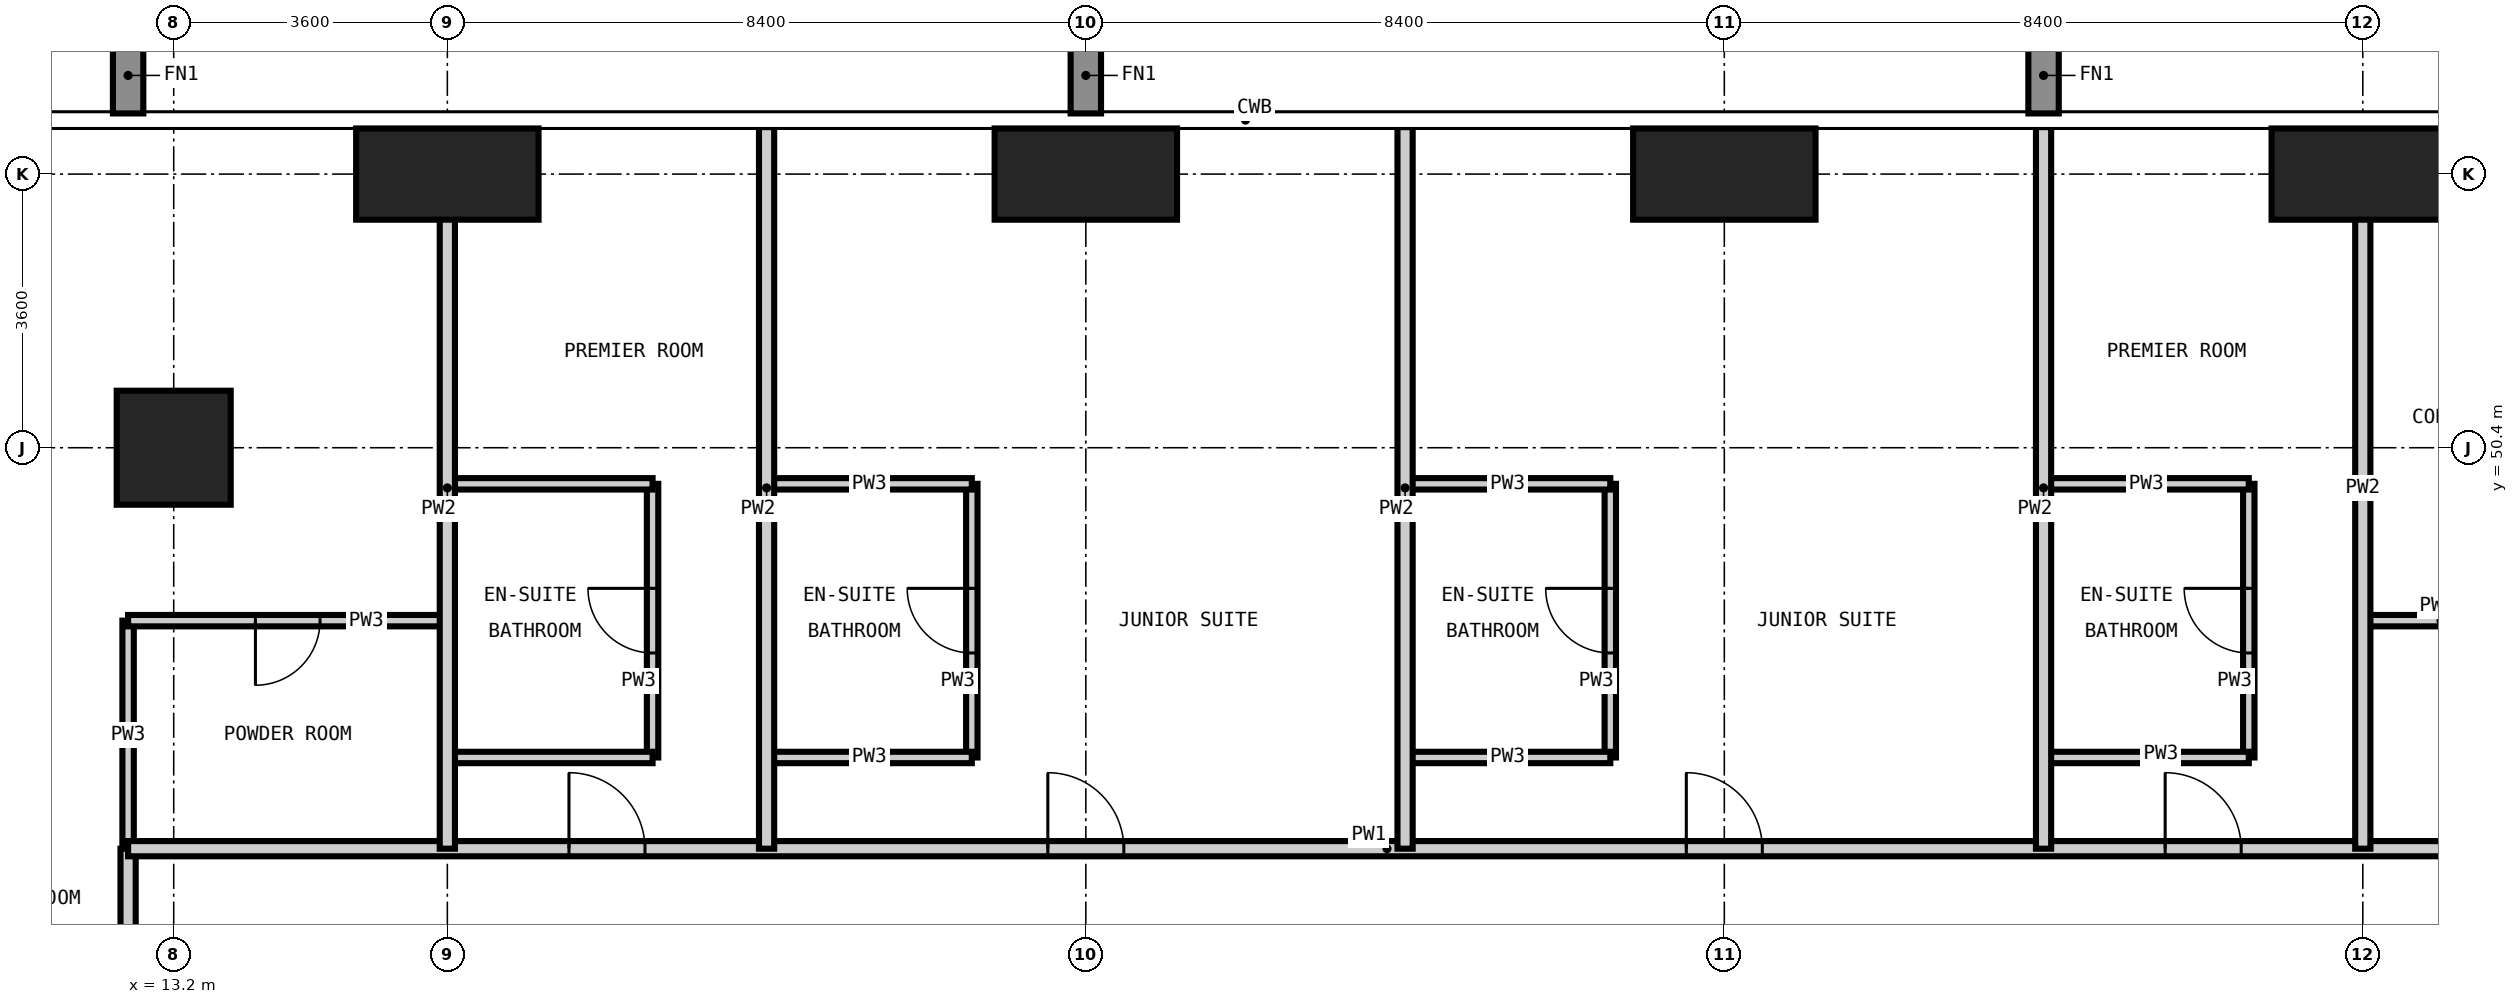
"""IFC4 building model, lengths in metres.
Left out: names, types, materials, properties, quantities, classifications, styles, units other than length and angle.
Written with IfcOpenShell. Run it as: python <this file> out.ifc"""

import sys

from ifc_helpers import new_model, si_unit, direction, frame, frame_2d, origin, origin_2d, place, context, subcontext, project, spatial, rectangle, extrude, element, fill, save


model = new_model("IFC4")
c1 = context("Model", 3, precision=1e-05, world=origin(), true_north=direction((0.0, 1.0)))
c2 = subcontext(c1, "Body", "Model", "MODEL_VIEW")
j1 = project(units=[si_unit("LENGTHUNIT", "METRE"), si_unit("PLANEANGLEUNIT", "RADIAN")], contexts=[c1])
p1 = place(None, origin())
s1 = spatial("IfcSite", under=j1, at=p1, CompositionType="ELEMENT")
p2 = place(p1, origin())
s2 = spatial("IfcBuilding", under=s1, at=p2, CompositionType="ELEMENT")
p3 = place(p2, frame((0.0, 0.0, 133.2)))
s3 = spatial("IfcBuildingStorey", under=s2, at=p3, CompositionType="ELEMENT", Elevation=133.2)
p4 = place(p3, frame((13.2, 50.4, -0.35), z_axis=(0.0, 0.0, 1.0), x_axis=(1.0, 0.0, 0.0)))
e1 = element("IfcColumn", 1, at=p4, inside=s3, PredefinedType="COLUMN", context=c2, shape_type="SweptSolid", body=[
    extrude(rectangle(XDim=1.5, YDim=1.5, at=origin_2d()), origin(), (0.0, 0.0, 1.0), 3.6),
])
for number, where, z_axis, x_axis in (
    (2, (16.8, 54.0, -0.35), (0.0, 0.0, 1.0), (1.0, 0.0, 0.0)),
    (3, (25.2, 54.0, -0.35), (0.0, 0.0, 1.0), (1.0, 0.0, 0.0)),
    (4, (33.6, 54.0, -0.35), (0.0, 0.0, 1.0), (1.0, 0.0, 0.0)),
    (5, (42.0, 54.0, -0.35), (0.0, 0.0, 1.0), (1.0, 0.0, 0.0)),
):
    element("IfcColumn", number, at=place(p3, frame(where, z_axis=z_axis, x_axis=x_axis)), inside=s3, PredefinedType="COLUMN", context=c2, shape_type="SweptSolid", body=[
        extrude(rectangle(XDim=2.4, YDim=1.2, at=origin_2d()), origin(), (0.0, 0.0, 1.0), 3.6),
    ])
p5 = place(p3, frame((12.6, 45.125, 0.0), z_axis=(0.0, 0.0, 1.0), x_axis=(0.0, 1.0, 0.0)))
e6 = element("IfcWall", 6, at=p5, inside=s3, PredefinedType="PARTITIONING", context=c2, shape_type="SweptSolid", body=[
    extrude(rectangle(XDim=3.0, YDim=0.15, at=frame_2d((1.5, 0.0))), origin(), (0.0, 0.0, 1.0), 3.25),
])
p6 = place(p3, frame((19.5, 46.325, 0.0), z_axis=(0.0, 0.0, 1.0), x_axis=(0.0, 1.0, 0.0)))
e7 = element("IfcWall", 7, at=p6, inside=s3, PredefinedType="PARTITIONING", context=c2, shape_type="SweptSolid", body=[
    extrude(rectangle(XDim=3.6, YDim=0.15, at=frame_2d((1.8, 0.0))), origin(), (0.0, 0.0, 1.0), 3.25),
])
p7 = place(p6, frame((1.375, 0.0, 0.0)))
e8 = element("IfcOpeningElement", 8, at=p7, cuts=e7, PredefinedType="OPENING", context=c2, shape_type="SweptSolid", body=[
    extrude(rectangle(XDim=0.85, YDim=2.1, at=frame_2d((0.425, 1.05))), frame((0.0, 0.085, 0.0), z_axis=(0.0, -1.0, 0.0), x_axis=(1.0, 0.0, 0.0)), (0.0, 0.0, 1.0), 0.17),
])
p8 = place(p3, frame((23.7, 46.325, 0.0), z_axis=(0.0, 0.0, 1.0), x_axis=(0.0, 1.0, 0.0)))
e9 = element("IfcWall", 9, at=p8, inside=s3, PredefinedType="PARTITIONING", context=c2, shape_type="SweptSolid", body=[
    extrude(rectangle(XDim=3.6, YDim=0.15, at=frame_2d((1.8, 0.0))), origin(), (0.0, 0.0, 1.0), 3.25),
])
p9 = place(p8, frame((1.375, 0.0, 0.0)))
e10 = element("IfcOpeningElement", 10, at=p9, cuts=e9, PredefinedType="OPENING", context=c2, shape_type="SweptSolid", body=[
    extrude(rectangle(XDim=0.85, YDim=2.1, at=frame_2d((0.425, 1.05))), frame((0.0, 0.085, 0.0), z_axis=(0.0, -1.0, 0.0), x_axis=(1.0, 0.0, 0.0)), (0.0, 0.0, 1.0), 0.17),
])
p10 = place(p3, frame((32.1, 46.325, 0.0), z_axis=(0.0, 0.0, 1.0), x_axis=(0.0, 1.0, 0.0)))
e11 = element("IfcWall", 11, at=p10, inside=s3, PredefinedType="PARTITIONING", context=c2, shape_type="SweptSolid", body=[
    extrude(rectangle(XDim=3.6, YDim=0.15, at=frame_2d((1.8, 0.0))), origin(), (0.0, 0.0, 1.0), 3.25),
])
p11 = place(p10, frame((1.375, 0.0, 0.0)))
e12 = element("IfcOpeningElement", 12, at=p11, cuts=e11, PredefinedType="OPENING", context=c2, shape_type="SweptSolid", body=[
    extrude(rectangle(XDim=0.85, YDim=2.1, at=frame_2d((0.425, 1.05))), frame((0.0, 0.085, 0.0), z_axis=(0.0, -1.0, 0.0), x_axis=(1.0, 0.0, 0.0)), (0.0, 0.0, 1.0), 0.17),
])
p12 = place(p3, frame((40.5, 46.325, 0.0), z_axis=(0.0, 0.0, 1.0), x_axis=(0.0, 1.0, 0.0)))
e13 = element("IfcWall", 13, at=p12, inside=s3, PredefinedType="PARTITIONING", context=c2, shape_type="SweptSolid", body=[
    extrude(rectangle(XDim=3.6, YDim=0.15, at=frame_2d((1.8, 0.0))), origin(), (0.0, 0.0, 1.0), 3.25),
])
p13 = place(p12, frame((1.375, 0.0, 0.0)))
e14 = element("IfcOpeningElement", 14, at=p13, cuts=e13, PredefinedType="OPENING", context=c2, shape_type="SweptSolid", body=[
    extrude(rectangle(XDim=0.85, YDim=2.1, at=frame_2d((0.425, 1.05))), frame((0.0, 0.085, 0.0), z_axis=(0.0, -1.0, 0.0), x_axis=(1.0, 0.0, 0.0)), (0.0, 0.0, 1.0), 0.17),
])
for number, where, z_axis, x_axis in (
    (15, (16.8, 46.325, 0.0), (0.0, 0.0, 1.0), (1.0, 0.0, 0.0)),
    (16, (21.0, 46.325, 0.0), (0.0, 0.0, 1.0), (1.0, 0.0, 0.0)),
):
    element("IfcWall", number, at=place(p3, frame(where, z_axis=z_axis, x_axis=x_axis)), inside=s3, PredefinedType="PARTITIONING", context=c2, shape_type="SweptSolid", body=[
        extrude(rectangle(XDim=2.7, YDim=0.15, at=frame_2d((1.35, 0.0))), origin(), (0.0, 0.0, 1.0), 3.25),
    ])
p14 = place(p3, frame((29.4, 46.325, 0.0), z_axis=(0.0, 0.0, 1.0), x_axis=(1.0, 0.0, 0.0)))
e17 = element("IfcWall", 17, at=p14, inside=s3, PredefinedType="PARTITIONING", context=c2, shape_type="SweptSolid", body=[
    extrude(rectangle(XDim=2.7, YDim=0.15, at=frame_2d((1.35, 0.0))), origin(), (0.0, 0.0, 1.0), 3.25),
])
p15 = place(p3, frame((37.8, 46.325, 0.0), z_axis=(0.0, 0.0, 1.0), x_axis=(1.0, 0.0, 0.0)))
e18 = element("IfcWall", 18, at=p15, inside=s3, PredefinedType="PARTITIONING", context=c2, shape_type="SweptSolid", body=[
    extrude(rectangle(XDim=2.7, YDim=0.15, at=frame_2d((1.35, 0.0))), origin(), (0.0, 0.0, 1.0), 3.25),
])
p16 = place(p3, frame((12.6, 48.125, 0.0), z_axis=(0.0, 0.0, 1.0), x_axis=(1.0, 0.0, 0.0)))
e19 = element("IfcWall", 19, at=p16, inside=s3, PredefinedType="PARTITIONING", context=c2, shape_type="SweptSolid", body=[
    extrude(rectangle(XDim=4.2, YDim=0.15, at=frame_2d((2.1, 0.0))), origin(), (0.0, 0.0, 1.0), 3.25),
])
p17 = place(p16, frame((1.675, 0.0, 0.0)))
e20 = element("IfcOpeningElement", 20, at=p17, cuts=e19, PredefinedType="OPENING", context=c2, shape_type="SweptSolid", body=[
    extrude(rectangle(XDim=0.85, YDim=2.1, at=frame_2d((0.425, 1.05))), frame((0.0, 0.085, 0.0), z_axis=(0.0, -1.0, 0.0), x_axis=(1.0, 0.0, 0.0)), (0.0, 0.0, 1.0), 0.17),
])
p18 = place(p3, frame((42.0, 48.125, 0.0), z_axis=(0.0, 0.0, 1.0), x_axis=(1.0, 0.0, 0.0)))
e21 = element("IfcWall", 21, at=p18, inside=s3, PredefinedType="PARTITIONING", context=c2, shape_type="SweptSolid", body=[
    extrude(rectangle(XDim=3.725, YDim=0.15, at=frame_2d((1.863, 0.0))), origin(), (0.0, 0.0, 1.0), 3.25),
])
p19 = place(p18, frame((1.438, 0.0, 0.0)))
e22 = element("IfcOpeningElement", 22, at=p19, cuts=e21, PredefinedType="OPENING", context=c2, shape_type="SweptSolid", body=[
    extrude(rectangle(XDim=0.85, YDim=2.1, at=frame_2d((0.425, 1.05))), frame((0.0, 0.085, 0.0), z_axis=(0.0, -1.0, 0.0), x_axis=(1.0, 0.0, 0.0)), (0.0, 0.0, 1.0), 0.17),
])
for number, where, z_axis, x_axis in (
    (23, (16.8, 49.925, 0.0), (0.0, 0.0, 1.0), (1.0, 0.0, 0.0)),
    (24, (21.0, 49.925, 0.0), (0.0, 0.0, 1.0), (1.0, 0.0, 0.0)),
):
    element("IfcWall", number, at=place(p3, frame(where, z_axis=z_axis, x_axis=x_axis)), inside=s3, PredefinedType="PARTITIONING", context=c2, shape_type="SweptSolid", body=[
        extrude(rectangle(XDim=2.7, YDim=0.15, at=frame_2d((1.35, 0.0))), origin(), (0.0, 0.0, 1.0), 3.25),
    ])
p20 = place(p3, frame((29.4, 49.925, 0.0), z_axis=(0.0, 0.0, 1.0), x_axis=(1.0, 0.0, 0.0)))
e25 = element("IfcWall", 25, at=p20, inside=s3, PredefinedType="PARTITIONING", context=c2, shape_type="SweptSolid", body=[
    extrude(rectangle(XDim=2.7, YDim=0.15, at=frame_2d((1.35, 0.0))), origin(), (0.0, 0.0, 1.0), 3.25),
])
p21 = place(p3, frame((37.8, 49.925, 0.0), z_axis=(0.0, 0.0, 1.0), x_axis=(1.0, 0.0, 0.0)))
e26 = element("IfcWall", 26, at=p21, inside=s3, PredefinedType="PARTITIONING", context=c2, shape_type="SweptSolid", body=[
    extrude(rectangle(XDim=2.7, YDim=0.15, at=frame_2d((1.35, 0.0))), origin(), (0.0, 0.0, 1.0), 3.25),
])
p22 = place(p3, frame((12.6, 14.275, 0.0), z_axis=(0.0, 0.0, 1.0), x_axis=(0.0, 1.0, 0.0)))
e27 = element("IfcWall", 27, at=p22, inside=s3, PredefinedType="PARTITIONING", context=c2, shape_type="SweptSolid", body=[
    extrude(rectangle(XDim=30.85, YDim=0.2, at=frame_2d((15.425, 0.0))), origin(), (0.0, 0.0, 1.0), 3.25),
])
p23 = place(p22, frame((6.225, 0.0, 0.0)))
e28 = element("IfcOpeningElement", 28, at=p23, cuts=e27, PredefinedType="OPENING", context=c2, shape_type="SweptSolid", body=[
    extrude(rectangle(XDim=1.0, YDim=2.2, at=frame_2d((0.5, 1.1))), frame((0.0, 0.11, 0.0), z_axis=(0.0, -1.0, 0.0), x_axis=(1.0, 0.0, 0.0)), (0.0, 0.0, 1.0), 0.22),
])
p24 = place(p22, frame((12.525, 0.0, 0.0)))
e29 = element("IfcOpeningElement", 29, at=p24, cuts=e27, PredefinedType="OPENING", context=c2, shape_type="SweptSolid", body=[
    extrude(rectangle(XDim=1.0, YDim=2.2, at=frame_2d((0.5, 1.1))), frame((0.0, 0.11, 0.0), z_axis=(0.0, -1.0, 0.0), x_axis=(1.0, 0.0, 0.0)), (0.0, 0.0, 1.0), 0.22),
])
p25 = place(p22, frame((20.925, 0.0, 0.0)))
e30 = element("IfcOpeningElement", 30, at=p25, cuts=e27, PredefinedType="OPENING", context=c2, shape_type="SweptSolid", body=[
    extrude(rectangle(XDim=1.0, YDim=2.2, at=frame_2d((0.5, 1.1))), frame((0.0, 0.11, 0.0), z_axis=(0.0, -1.0, 0.0), x_axis=(1.0, 0.0, 0.0)), (0.0, 0.0, 1.0), 0.22),
])
p26 = place(p22, frame((0.663, 0.0, 0.0)))
e31 = element("IfcOpeningElement", 31, at=p26, cuts=e27, PredefinedType="OPENING", context=c2, shape_type="SweptSolid", body=[
    extrude(rectangle(XDim=1.0, YDim=2.2, at=frame_2d((0.5, 1.1))), frame((0.0, 0.11, 0.0), z_axis=(0.0, -1.0, 0.0), x_axis=(1.0, 0.0, 0.0)), (0.0, 0.0, 1.0), 0.22),
])
p27 = place(p22, frame((28.787, 0.0, 0.0)))
e32 = element("IfcOpeningElement", 32, at=p27, cuts=e27, PredefinedType="OPENING", context=c2, shape_type="SweptSolid", body=[
    extrude(rectangle(XDim=1.0, YDim=2.2, at=frame_2d((0.5, 1.1))), frame((0.0, 0.11, 0.0), z_axis=(0.0, -1.0, 0.0), x_axis=(1.0, 0.0, 0.0)), (0.0, 0.0, 1.0), 0.22),
])
p28 = place(p3, frame((12.6, 45.125, 0.0), z_axis=(0.0, 0.0, 1.0), x_axis=(1.0, 0.0, 0.0)))
e33 = element("IfcWall", 33, at=p28, inside=s3, PredefinedType="PARTITIONING", context=c2, shape_type="SweptSolid", body=[
    extrude(rectangle(XDim=33.125, YDim=0.2, at=frame_2d((16.562, 0.0))), origin(), (0.0, 0.0, 1.0), 3.25),
])
p29 = place(p28, frame((5.8, 0.0, 0.0)))
e34 = element("IfcOpeningElement", 34, at=p29, cuts=e33, PredefinedType="OPENING", context=c2, shape_type="SweptSolid", body=[
    extrude(rectangle(XDim=1.0, YDim=2.2, at=frame_2d((0.5, 1.1))), frame((0.0, 0.11, 0.0), z_axis=(0.0, -1.0, 0.0), x_axis=(1.0, 0.0, 0.0)), (0.0, 0.0, 1.0), 0.22),
])
p30 = place(p28, frame((12.1, 0.0, 0.0)))
e35 = element("IfcOpeningElement", 35, at=p30, cuts=e33, PredefinedType="OPENING", context=c2, shape_type="SweptSolid", body=[
    extrude(rectangle(XDim=1.0, YDim=2.2, at=frame_2d((0.5, 1.1))), frame((0.0, 0.11, 0.0), z_axis=(0.0, -1.0, 0.0), x_axis=(1.0, 0.0, 0.0)), (0.0, 0.0, 1.0), 0.22),
])
p31 = place(p28, frame((20.5, 0.0, 0.0)))
e36 = element("IfcOpeningElement", 36, at=p31, cuts=e33, PredefinedType="OPENING", context=c2, shape_type="SweptSolid", body=[
    extrude(rectangle(XDim=1.0, YDim=2.2, at=frame_2d((0.5, 1.1))), frame((0.0, 0.11, 0.0), z_axis=(0.0, -1.0, 0.0), x_axis=(1.0, 0.0, 0.0)), (0.0, 0.0, 1.0), 0.22),
])
p32 = place(p28, frame((26.8, 0.0, 0.0)))
e37 = element("IfcOpeningElement", 37, at=p32, cuts=e33, PredefinedType="OPENING", context=c2, shape_type="SweptSolid", body=[
    extrude(rectangle(XDim=1.0, YDim=2.2, at=frame_2d((0.5, 1.1))), frame((0.0, 0.11, 0.0), z_axis=(0.0, -1.0, 0.0), x_axis=(1.0, 0.0, 0.0)), (0.0, 0.0, 1.0), 0.22),
])
for number, where, z_axis, x_axis in (
    (38, (16.8, 45.125, 0.0), (0.0, 0.0, 1.0), (0.0, 1.0, 0.0)),
    (39, (21.0, 45.125, 0.0), (0.0, 0.0, 1.0), (0.0, 1.0, 0.0)),
    (40, (29.4, 45.125, 0.0), (0.0, 0.0, 1.0), (0.0, 1.0, 0.0)),
    (41, (37.8, 45.125, 0.0), (0.0, 0.0, 1.0), (0.0, 1.0, 0.0)),
    (42, (42.0, 45.125, 0.0), (0.0, 0.0, 1.0), (0.0, 1.0, 0.0)),
):
    element("IfcWall", number, at=place(p3, frame(where, z_axis=z_axis, x_axis=x_axis)), inside=s3, PredefinedType="PARTITIONING", context=c2, shape_type="SweptSolid", body=[
        extrude(rectangle(XDim=9.493, YDim=0.2, at=frame_2d((4.747, 0.0))), origin(), (0.0, 0.0, 1.0), 3.25),
    ])
p33 = place(p29, origin())
e43 = element("IfcDoor", 43, at=p33, inside=s3, OperationType="SINGLE_SWING_LEFT", PredefinedType="DOOR", context=c2, shape_type="SweptSolid", body=[
    extrude(rectangle(XDim=1.0, YDim=2.2, at=frame_2d((0.5, 1.1))), frame((0.0, 0.025, 0.0), z_axis=(0.0, -1.0, 0.0), x_axis=(1.0, 0.0, 0.0)), (0.0, 0.0, 1.0), 0.05),
])
fill(e34, e43)
p34 = place(p7, origin())
e44 = element("IfcDoor", 44, at=p34, inside=s3, OperationType="SINGLE_SWING_RIGHT", PredefinedType="DOOR", context=c2, shape_type="SweptSolid", body=[
    extrude(rectangle(XDim=0.85, YDim=2.1, at=frame_2d((0.425, 1.05))), frame((0.0, 0.025, 0.0), z_axis=(0.0, -1.0, 0.0), x_axis=(1.0, 0.0, 0.0)), (0.0, 0.0, 1.0), 0.05),
])
fill(e8, e44)
p35 = place(p30, origin())
e45 = element("IfcDoor", 45, at=p35, inside=s3, OperationType="SINGLE_SWING_LEFT", PredefinedType="DOOR", context=c2, shape_type="SweptSolid", body=[
    extrude(rectangle(XDim=1.0, YDim=2.2, at=frame_2d((0.5, 1.1))), frame((0.0, 0.025, 0.0), z_axis=(0.0, -1.0, 0.0), x_axis=(1.0, 0.0, 0.0)), (0.0, 0.0, 1.0), 0.05),
])
fill(e35, e45)
p36 = place(p9, origin())
e46 = element("IfcDoor", 46, at=p36, inside=s3, OperationType="SINGLE_SWING_RIGHT", PredefinedType="DOOR", context=c2, shape_type="SweptSolid", body=[
    extrude(rectangle(XDim=0.85, YDim=2.1, at=frame_2d((0.425, 1.05))), frame((0.0, 0.025, 0.0), z_axis=(0.0, -1.0, 0.0), x_axis=(1.0, 0.0, 0.0)), (0.0, 0.0, 1.0), 0.05),
])
fill(e10, e46)
p37 = place(p31, origin())
e47 = element("IfcDoor", 47, at=p37, inside=s3, OperationType="SINGLE_SWING_LEFT", PredefinedType="DOOR", context=c2, shape_type="SweptSolid", body=[
    extrude(rectangle(XDim=1.0, YDim=2.2, at=frame_2d((0.5, 1.1))), frame((0.0, 0.025, 0.0), z_axis=(0.0, -1.0, 0.0), x_axis=(1.0, 0.0, 0.0)), (0.0, 0.0, 1.0), 0.05),
])
fill(e36, e47)
p38 = place(p11, origin())
e48 = element("IfcDoor", 48, at=p38, inside=s3, OperationType="SINGLE_SWING_RIGHT", PredefinedType="DOOR", context=c2, shape_type="SweptSolid", body=[
    extrude(rectangle(XDim=0.85, YDim=2.1, at=frame_2d((0.425, 1.05))), frame((0.0, 0.025, 0.0), z_axis=(0.0, -1.0, 0.0), x_axis=(1.0, 0.0, 0.0)), (0.0, 0.0, 1.0), 0.05),
])
fill(e12, e48)
p39 = place(p32, origin())
e49 = element("IfcDoor", 49, at=p39, inside=s3, OperationType="SINGLE_SWING_LEFT", PredefinedType="DOOR", context=c2, shape_type="SweptSolid", body=[
    extrude(rectangle(XDim=1.0, YDim=2.2, at=frame_2d((0.5, 1.1))), frame((0.0, 0.025, 0.0), z_axis=(0.0, -1.0, 0.0), x_axis=(1.0, 0.0, 0.0)), (0.0, 0.0, 1.0), 0.05),
])
fill(e37, e49)
p40 = place(p13, origin())
e50 = element("IfcDoor", 50, at=p40, inside=s3, OperationType="SINGLE_SWING_RIGHT", PredefinedType="DOOR", context=c2, shape_type="SweptSolid", body=[
    extrude(rectangle(XDim=0.85, YDim=2.1, at=frame_2d((0.425, 1.05))), frame((0.0, 0.025, 0.0), z_axis=(0.0, -1.0, 0.0), x_axis=(1.0, 0.0, 0.0)), (0.0, 0.0, 1.0), 0.05),
])
fill(e14, e50)
p41 = place(p17, frame((0.85, 0.0, 0.0), z_axis=(0.0, 0.0, 1.0), x_axis=(-1.0, 0.0, 0.0)))
e51 = element("IfcDoor", 51, at=p41, inside=s3, OperationType="SINGLE_SWING_RIGHT", PredefinedType="DOOR", context=c2, shape_type="SweptSolid", body=[
    extrude(rectangle(XDim=0.85, YDim=2.1, at=frame_2d((0.425, 1.05))), frame((0.0, 0.025, 0.0), z_axis=(0.0, -1.0, 0.0), x_axis=(1.0, 0.0, 0.0)), (0.0, 0.0, 1.0), 0.05),
])
fill(e20, e51)
save(model, sys.argv[1])
